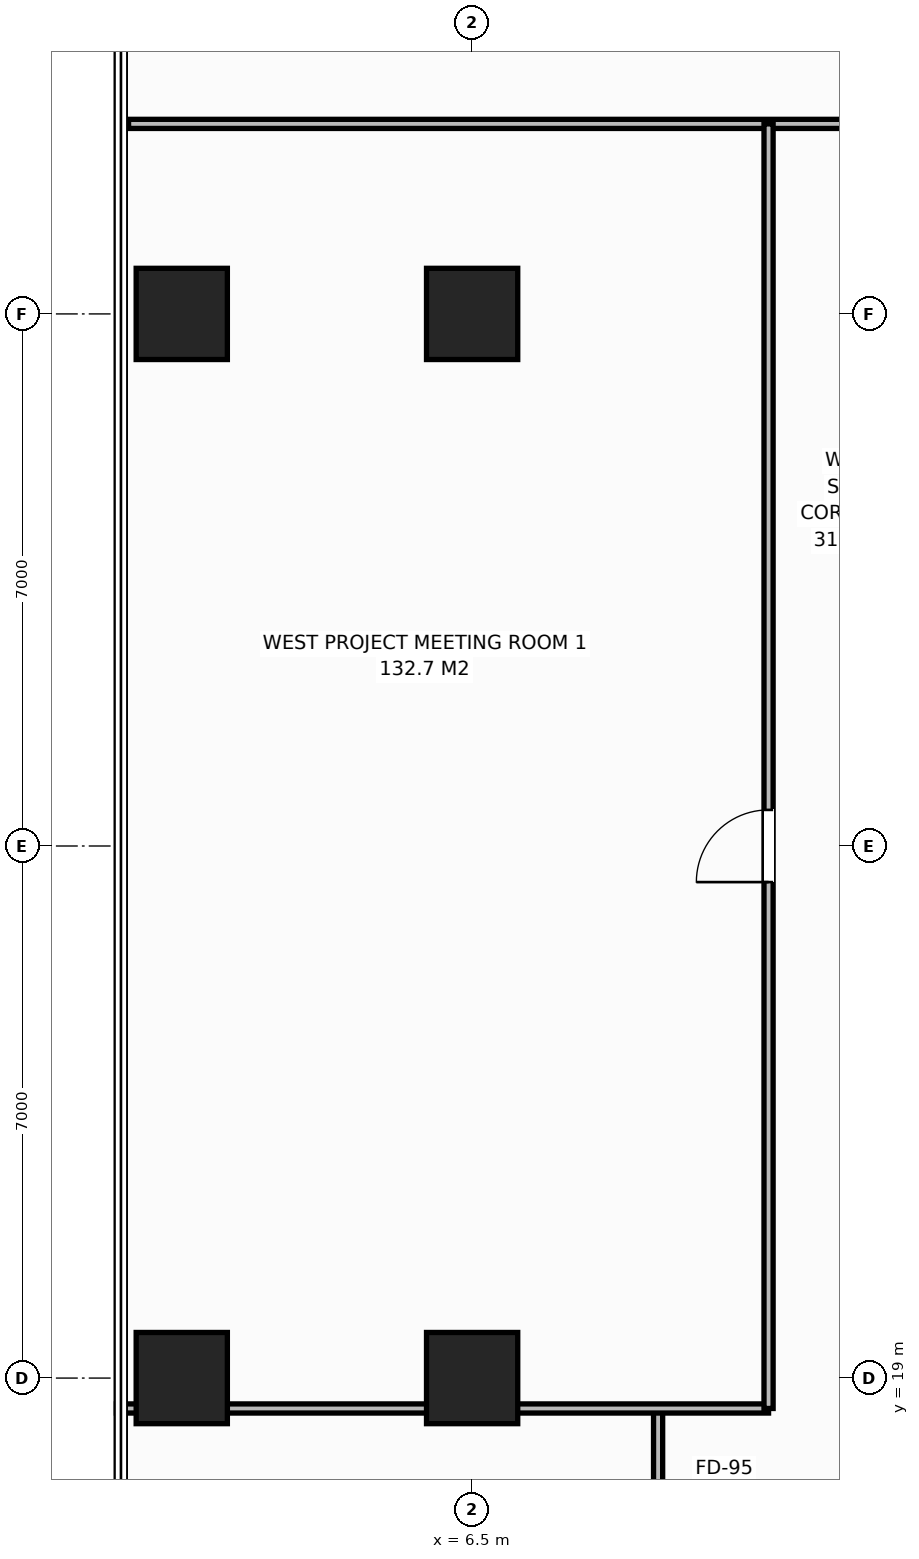
"""IFC4 building model, lengths in metres.
Left out: names, types, materials, properties, quantities, classifications, styles, units other than length and angle.
Written with IfcOpenShell. Run it as: python <this file> out.ifc"""

import sys

from ifc_helpers import new_model, si_unit, direction, frame, frame_2d, origin, origin_2d, place, context, subcontext, project, spatial, rectangle, extrude, element, fill, save


model = new_model("IFC4")
c1 = context("Model", 3, precision=1e-05, world=origin(), true_north=direction((0.0, 1.0)))
c2 = subcontext(c1, "Body", "Model", "MODEL_VIEW")
j1 = project(units=[si_unit("LENGTHUNIT", "METRE"), si_unit("PLANEANGLEUNIT", "RADIAN")], contexts=[c1])
p1 = place(None, origin())
s1 = spatial("IfcSite", under=j1, at=p1, CompositionType="ELEMENT")
p2 = place(p1, origin())
s2 = spatial("IfcBuilding", under=s1, at=p2, CompositionType="ELEMENT")
p3 = place(p2, frame((0.0, 0.0, 97.4)))
s3 = spatial("IfcBuildingStorey", under=s2, at=p3, CompositionType="ELEMENT", Elevation=97.4)
for number, where, z_axis, x_axis in (
    (1, (6.5, 19.0, 0.0), (0.0, 0.0, 1.0), (1.0, 0.0, 0.0)),
    (2, (6.5, 33.0, 0.0), (0.0, 0.0, 1.0), (1.0, 0.0, 0.0)),
    (3, (2.68, 19.0, 0.0), (0.0, 0.0, 1.0), (1.0, 0.0, 0.0)),
    (4, (2.68, 33.0, 0.0), (0.0, 0.0, 1.0), (1.0, 0.0, 0.0)),
):
    element("IfcColumn", number, at=place(p3, frame(where, z_axis=z_axis, x_axis=x_axis)), inside=s3, PredefinedType="COLUMN", context=c2, shape_type="SweptSolid", body=[
        extrude(rectangle(XDim=1.2, YDim=1.2, at=origin_2d()), origin(), (0.0, 0.0, 1.0), 3.8),
    ])
p4 = place(p3, frame((8.947, 16.5, 0.0), z_axis=(0.0, 0.0, 1.0), x_axis=(0.0, 1.0, 0.0)))
e5 = element("IfcWall", 5, at=p4, inside=s3, PredefinedType="PARTITIONING", context=c2, shape_type="SweptSolid", body=[
    extrude(rectangle(XDim=2.1, YDim=0.12, at=frame_2d((1.05, 0.0))), origin(), (0.0, 0.0, 1.0), 3.565),
])
p5 = place(p3, frame((1.98, 35.5, 0.0), z_axis=(0.0, 0.0, 1.0), x_axis=(1.0, 0.0, 0.0)))
e6 = element("IfcWall", 6, at=p5, inside=s3, PredefinedType="PARTITIONING", context=c2, shape_type="SweptSolid", body=[
    extrude(rectangle(XDim=19.339, YDim=0.12, at=frame_2d((9.669, 0.0))), origin(), (0.0, 0.0, 1.0), 3.565),
])
p6 = place(p5, frame((13.404, 0.0, 0.0)))
e7 = element("IfcOpeningElement", 7, at=p6, cuts=e6, PredefinedType="OPENING", context=c2, shape_type="SweptSolid", body=[
    extrude(rectangle(XDim=0.95, YDim=2.15, at=frame_2d((0.475, 1.075))), frame((0.0, 0.07, 0.0), z_axis=(0.0, -1.0, 0.0), x_axis=(1.0, 0.0, 0.0)), (0.0, 0.0, 1.0), 0.14),
])
p7 = place(p3, frame((1.82, 18.6, 0.0), z_axis=(0.0, 0.0, 1.0), x_axis=(1.0, 0.0, 0.0)))
e8 = element("IfcWall", 8, at=p7, inside=s3, PredefinedType="PARTITIONING", context=c2, shape_type="SweptSolid", body=[
    extrude(rectangle(XDim=8.58, YDim=0.12, at=frame_2d((4.29, 0.0))), origin(), (0.0, 0.0, 1.0), 3.565),
])
p8 = place(p3, frame((10.4, 18.6, 0.0), z_axis=(0.0, 0.0, 1.0), x_axis=(0.0, 1.0, 0.0)))
e9 = element("IfcWall", 9, at=p8, inside=s3, PredefinedType="PARTITIONING", context=c2, shape_type="SweptSolid", body=[
    extrude(rectangle(XDim=16.9, YDim=0.12, at=frame_2d((8.45, 0.0))), origin(), (0.0, 0.0, 1.0), 3.565),
])
p9 = place(p8, frame((6.925, 0.0, 0.0)))
e10 = element("IfcOpeningElement", 10, at=p9, cuts=e9, PredefinedType="OPENING", context=c2, shape_type="SweptSolid", body=[
    extrude(rectangle(XDim=0.95, YDim=2.15, at=frame_2d((0.475, 1.075))), frame((0.0, 0.07, 0.0), z_axis=(0.0, -1.0, 0.0), x_axis=(1.0, 0.0, 0.0)), (0.0, 0.0, 1.0), 0.14),
])
p10 = place(p9, origin())
e11 = element("IfcDoor", 11, at=p10, inside=s3, OperationType="SINGLE_SWING_LEFT", PredefinedType="DOOR", context=c2, shape_type="SweptSolid", body=[
    extrude(rectangle(XDim=0.95, YDim=2.15, at=frame_2d((0.475, 1.075))), frame((0.0, 0.025, 0.0), z_axis=(0.0, -1.0, 0.0), x_axis=(1.0, 0.0, 0.0)), (0.0, 0.0, 1.0), 0.05),
])
fill(e10, e11)
save(model, sys.argv[1])
